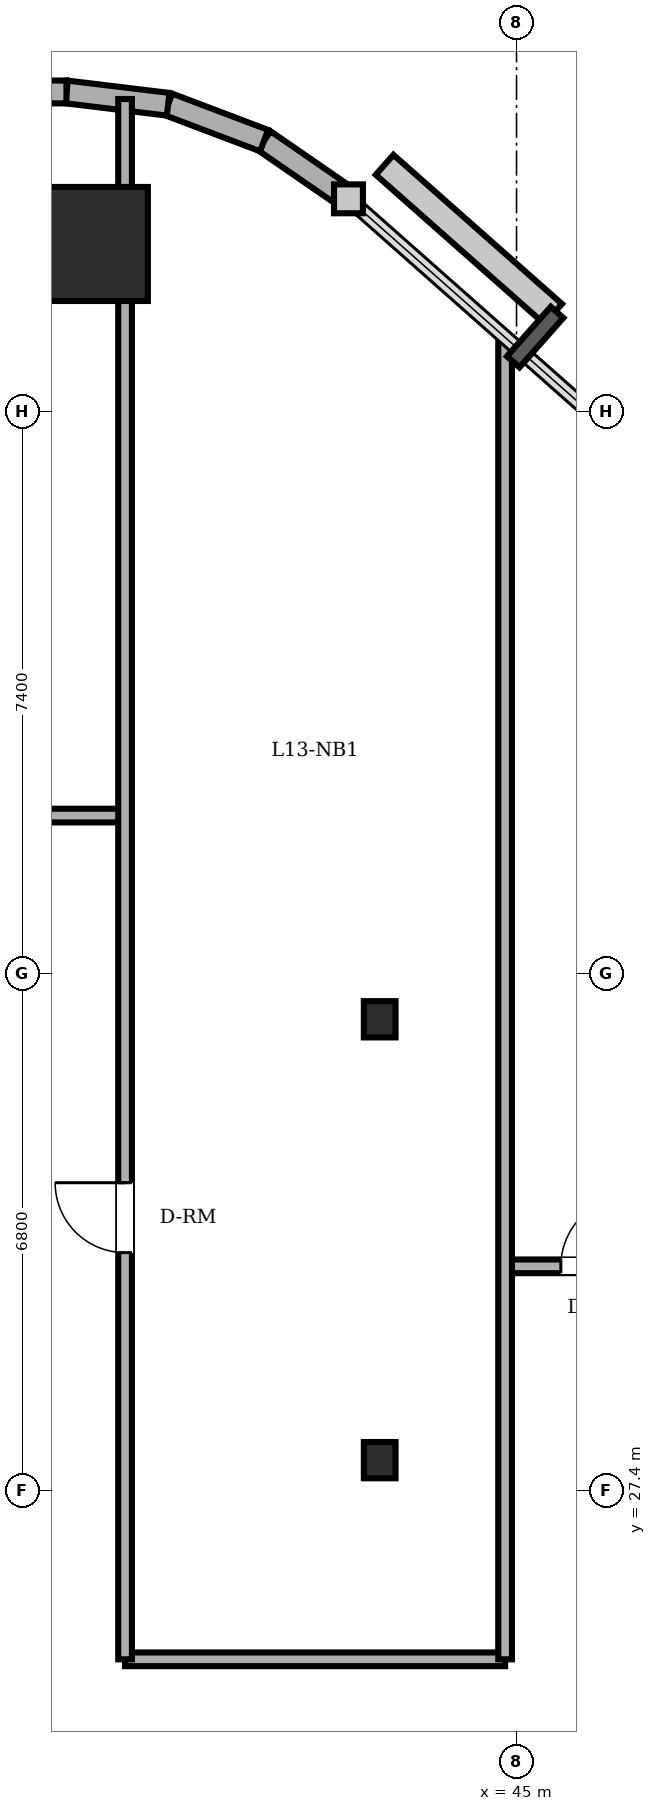
"""IFC4 building model, lengths in metres.
Left out: names, types, materials, properties, quantities, classifications, styles, units other than length and angle.
Written with IfcOpenShell. Run it as: python <this file> out.ifc"""

import sys

from ifc_helpers import new_model, si_unit, direction, frame, frame_2d, origin, origin_2d, place, context, subcontext, project, spatial, rectangle, circle, i_section, extrude, element, fill, save


model = new_model("IFC4")
c1 = context("Model", 3, precision=1e-05, world=origin(), true_north=direction((0.0, 1.0)))
c2 = subcontext(c1, "Body", "Model", "MODEL_VIEW")
j1 = project(units=[si_unit("LENGTHUNIT", "METRE"), si_unit("PLANEANGLEUNIT", "RADIAN")], contexts=[c1])
p1 = place(None, origin())
s1 = spatial("IfcSite", under=j1, at=p1, CompositionType="ELEMENT")
p2 = place(p1, origin())
s2 = spatial("IfcBuilding", under=s1, at=p2, CompositionType="ELEMENT")
p3 = place(p2, frame((0.0, 0.0, 50.4)))
s3 = spatial("IfcBuildingStorey", under=s2, at=p3, CompositionType="ELEMENT", Elevation=50.4)
p4 = place(p3, frame((39.4, 43.8, 0.0), z_axis=(0.0, 0.0, 1.0), x_axis=(1.0, 0.0, 0.0)))
e1 = element("IfcColumn", 1, at=p4, inside=s3, PredefinedType="COLUMN", context=c2, shape_type="SweptSolid", body=[
    extrude(circle(Radius=0.75, at=origin_2d()), origin(), (0.0, 0.0, 1.0), 3.6),
])
for number, where, z_axis, x_axis in (
    (2, (43.2, 27.8, 0.0), (0.0, 0.0, 1.0), (1.0, 0.0, 0.0)),
    (3, (43.2, 33.6, 0.0), (0.0, 0.0, 1.0), (1.0, 0.0, 0.0)),
):
    element("IfcColumn", number, at=place(p3, frame(where, z_axis=z_axis, x_axis=x_axis)), inside=s3, PredefinedType="COLUMN", context=c2, shape_type="SweptSolid", body=[
        extrude(i_section(OverallWidth=0.417, OverallDepth=0.477, WebThickness=0.036, FlangeThickness=0.057, FilletRadius=0.015, at=origin_2d()), origin(), (0.0, 0.0, 1.0), 3.6),
    ])
p5 = place(p3, frame((42.789, 44.394, 0.0), z_axis=(0.0, 0.0, 1.0), x_axis=(-0.823116500192, 0.567872544777, 0.0)))
e4 = element("IfcWall", 4, at=p5, inside=s3, PredefinedType="SOLIDWALL", context=c2, shape_type="SweptSolid", body=[
    extrude(rectangle(XDim=1.349, YDim=0.3, at=frame_2d((0.674, 0.0))), origin(), (0.0, 0.0, 1.0), 3.4),
])
p6 = place(p3, frame((41.679, 45.16, 0.0), z_axis=(0.0, 0.0, 1.0), x_axis=(-0.935156721165, 0.354234254216, 0.0)))
e5 = element("IfcWall", 5, at=p6, inside=s3, PredefinedType="SOLIDWALL", context=c2, shape_type="SweptSolid", body=[
    extrude(rectangle(XDim=1.349, YDim=0.3, at=frame_2d((0.675, 0.0))), origin(), (0.0, 0.0, 1.0), 3.4),
])
p7 = place(p3, frame((40.417, 45.638, 0.0), z_axis=(0.0, 0.0, 1.0), x_axis=(-0.992739027259, 0.120288086515, 0.0)))
e6 = element("IfcWall", 6, at=p7, inside=s3, PredefinedType="SOLIDWALL", context=c2, shape_type="SweptSolid", body=[
    extrude(rectangle(XDim=1.348, YDim=0.3, at=frame_2d((0.674, 0.0))), origin(), (0.0, 0.0, 1.0), 3.4),
])
p8 = place(p3, frame((39.079, 45.8, 0.0), z_axis=(0.0, 0.0, 1.0), x_axis=(-1.0, 0.0, 0.0)))
e7 = element("IfcWall", 7, at=p8, inside=s3, PredefinedType="SOLIDWALL", context=c2, shape_type="SweptSolid", body=[
    extrude(rectangle(XDim=30.079, YDim=0.3, at=frame_2d((15.04, 0.0))), origin(), (0.0, 0.0, 1.0), 3.4),
])
p9 = place(p8, frame((22.404, 0.0, 0.0)))
e8 = element("IfcOpeningElement", 8, at=p9, cuts=e7, PredefinedType="OPENING", context=c2, shape_type="SweptSolid", body=[
    extrude(rectangle(XDim=0.95, YDim=2.2, at=frame_2d((0.475, 1.1))), frame((0.0, 0.16, 0.0), z_axis=(0.0, -1.0, 0.0), x_axis=(1.0, 0.0, 0.0)), (0.0, 0.0, 1.0), 0.32),
])
p10 = place(p8, frame((2.226, 0.0, 0.85)))
e9 = element("IfcOpeningElement", 9, at=p10, cuts=e7, PredefinedType="OPENING", context=c2, shape_type="SweptSolid", body=[
    extrude(rectangle(XDim=1.8, YDim=1.55, at=frame_2d((0.9, 0.775))), frame((0.0, 0.16, 0.0), z_axis=(0.0, -1.0, 0.0), x_axis=(1.0, 0.0, 0.0)), (0.0, 0.0, 1.0), 0.32),
])
p11 = place(p8, frame((5.003, 0.0, 0.85)))
e10 = element("IfcOpeningElement", 10, at=p11, cuts=e7, PredefinedType="OPENING", context=c2, shape_type="SweptSolid", body=[
    extrude(rectangle(XDim=1.8, YDim=1.55, at=frame_2d((0.9, 0.775))), frame((0.0, 0.16, 0.0), z_axis=(0.0, -1.0, 0.0), x_axis=(1.0, 0.0, 0.0)), (0.0, 0.0, 1.0), 0.32),
])
p12 = place(p8, frame((10.179, 0.0, 0.85)))
e11 = element("IfcOpeningElement", 11, at=p12, cuts=e7, PredefinedType="OPENING", context=c2, shape_type="SweptSolid", body=[
    extrude(rectangle(XDim=1.8, YDim=1.55, at=frame_2d((0.9, 0.775))), frame((0.0, 0.16, 0.0), z_axis=(0.0, -1.0, 0.0), x_axis=(1.0, 0.0, 0.0)), (0.0, 0.0, 1.0), 0.32),
])
p13 = place(p8, frame((12.579, 0.0, 0.85)))
e12 = element("IfcOpeningElement", 12, at=p13, cuts=e7, PredefinedType="OPENING", context=c2, shape_type="SweptSolid", body=[
    extrude(rectangle(XDim=1.8, YDim=1.55, at=frame_2d((0.9, 0.775))), frame((0.0, 0.16, 0.0), z_axis=(0.0, -1.0, 0.0), x_axis=(1.0, 0.0, 0.0)), (0.0, 0.0, 1.0), 0.32),
])
p14 = place(p8, frame((19.596, 0.0, 0.85)))
e13 = element("IfcOpeningElement", 13, at=p14, cuts=e7, PredefinedType="OPENING", context=c2, shape_type="SweptSolid", body=[
    extrude(rectangle(XDim=1.8, YDim=1.55, at=frame_2d((0.9, 0.775))), frame((0.0, 0.16, 0.0), z_axis=(0.0, -1.0, 0.0), x_axis=(1.0, 0.0, 0.0)), (0.0, 0.0, 1.0), 0.32),
])
p15 = place(p8, frame((24.212, 0.0, 0.85)))
e14 = element("IfcOpeningElement", 14, at=p15, cuts=e7, PredefinedType="OPENING", context=c2, shape_type="SweptSolid", body=[
    extrude(rectangle(XDim=1.8, YDim=1.55, at=frame_2d((0.9, 0.775))), frame((0.0, 0.16, 0.0), z_axis=(0.0, -1.0, 0.0), x_axis=(1.0, 0.0, 0.0)), (0.0, 0.0, 1.0), 0.32),
])
p16 = place(p3, frame((39.85, 25.18, 0.0), z_axis=(0.0, 0.0, 1.0), x_axis=(1.0, 0.0, 0.0)))
e15 = element("IfcWall", 15, at=p16, inside=s3, PredefinedType="PARTITIONING", context=c2, shape_type="SweptSolid", body=[
    extrude(rectangle(XDim=5.0, YDim=0.18, at=frame_2d((2.5, 0.0))), origin(), (0.0, 0.0, 1.0), 3.4),
])
p17 = place(p3, frame((44.85, 30.35, 0.0), z_axis=(0.0, 0.0, 1.0), x_axis=(1.0, 0.0, 0.0)))
e16 = element("IfcWall", 16, at=p17, inside=s3, PredefinedType="PARTITIONING", context=c2, shape_type="SweptSolid", body=[
    extrude(rectangle(XDim=6.75, YDim=0.18, at=frame_2d((3.375, 0.0))), origin(), (0.0, 0.0, 1.0), 3.4),
])
p18 = place(p17, frame((0.733, 0.0, 0.0)))
e17 = element("IfcOpeningElement", 17, at=p18, cuts=e16, PredefinedType="OPENING", context=c2, shape_type="SweptSolid", body=[
    extrude(rectangle(XDim=0.92, YDim=2.1, at=frame_2d((0.46, 1.05))), frame((0.0, 0.1, 0.0), z_axis=(0.0, -1.0, 0.0), x_axis=(1.0, 0.0, 0.0)), (0.0, 0.0, 1.0), 0.2),
])
p19 = place(p3, frame((3.4, 36.28, 0.0), z_axis=(0.0, 0.0, 1.0), x_axis=(1.0, 0.0, 0.0)))
e18 = element("IfcWall", 18, at=p19, inside=s3, PredefinedType="PARTITIONING", context=c2, shape_type="SweptSolid", body=[
    extrude(rectangle(XDim=36.45, YDim=0.18, at=frame_2d((18.225, 0.0))), origin(), (0.0, 0.0, 1.0), 3.4),
])
p20 = place(p19, frame((21.05, 0.0, 0.0)))
e19 = element("IfcOpeningElement", 19, at=p20, cuts=e18, PredefinedType="OPENING", context=c2, shape_type="SweptSolid", body=[
    extrude(rectangle(XDim=0.9, YDim=2.1, at=frame_2d((0.45, 1.05))), frame((0.0, 0.1, 0.0), z_axis=(0.0, -1.0, 0.0), x_axis=(1.0, 0.0, 0.0)), (0.0, 0.0, 1.0), 0.2),
])
p21 = place(p19, frame((24.67, 0.0, 0.0)))
e20 = element("IfcOpeningElement", 20, at=p21, cuts=e18, PredefinedType="OPENING", context=c2, shape_type="SweptSolid", body=[
    extrude(rectangle(XDim=0.86, YDim=2.1, at=frame_2d((0.43, 1.05))), frame((0.0, 0.1, 0.0), z_axis=(0.0, -1.0, 0.0), x_axis=(1.0, 0.0, 0.0)), (0.0, 0.0, 1.0), 0.2),
])
p22 = place(p19, frame((10.7, 0.0, 0.0)))
e21 = element("IfcOpeningElement", 21, at=p22, cuts=e18, PredefinedType="OPENING", context=c2, shape_type="SweptSolid", body=[
    extrude(rectangle(XDim=1.0, YDim=2.15, at=frame_2d((0.5, 1.075))), frame((0.0, 0.1, 0.0), z_axis=(0.0, -1.0, 0.0), x_axis=(1.0, 0.0, 0.0)), (0.0, 0.0, 1.0), 0.2),
])
p23 = place(p19, frame((30.965, 0.0, 0.0)))
e22 = element("IfcOpeningElement", 22, at=p23, cuts=e18, PredefinedType="OPENING", context=c2, shape_type="SweptSolid", body=[
    extrude(rectangle(XDim=1.0, YDim=2.15, at=frame_2d((0.5, 1.075))), frame((0.0, 0.1, 0.0), z_axis=(0.0, -1.0, 0.0), x_axis=(1.0, 0.0, 0.0)), (0.0, 0.0, 1.0), 0.2),
])
p24 = place(p3, frame((39.85, 25.18, 0.0), z_axis=(0.0, 0.0, 1.0), x_axis=(0.0, 1.0, 0.0)))
e23 = element("IfcWall", 23, at=p24, inside=s3, PredefinedType="PARTITIONING", context=c2, shape_type="SweptSolid", body=[
    extrude(rectangle(XDim=20.527, YDim=0.18, at=frame_2d((10.264, 0.0))), origin(), (0.0, 0.0, 1.0), 2.782),
])
p25 = place(p24, frame((5.35, 0.0, 0.0)))
e24 = element("IfcOpeningElement", 24, at=p25, cuts=e23, PredefinedType="OPENING", context=c2, shape_type="SweptSolid", body=[
    extrude(rectangle(XDim=0.92, YDim=2.1, at=frame_2d((0.46, 1.05))), frame((0.0, 0.1, 0.0), z_axis=(0.0, -1.0, 0.0), x_axis=(1.0, 0.0, 0.0)), (0.0, 0.0, 1.0), 0.2),
])
p26 = place(p3, frame((44.85, 25.18, 0.0), z_axis=(0.0, 0.0, 1.0), x_axis=(0.0, 1.0, 0.0)))
e25 = element("IfcWall", 25, at=p26, inside=s3, PredefinedType="PARTITIONING", context=c2, shape_type="SweptSolid", body=[
    extrude(rectangle(XDim=17.391, YDim=0.18, at=frame_2d((8.696, 0.0))), origin(), (0.0, 0.0, 1.0), 3.4),
])
p27 = place(p25, origin())
e26 = element("IfcDoor", 26, at=p27, inside=s3, OperationType="SINGLE_SWING_RIGHT", PredefinedType="DOOR", context=c2, shape_type="SweptSolid", body=[
    extrude(rectangle(XDim=0.92, YDim=2.1, at=frame_2d((0.46, 1.05))), frame((0.0, 0.025, 0.0), z_axis=(0.0, -1.0, 0.0), x_axis=(1.0, 0.0, 0.0)), (0.0, 0.0, 1.0), 0.05),
])
fill(e24, e26)
p28 = place(p18, origin())
e27 = element("IfcDoor", 27, at=p28, inside=s3, OperationType="SINGLE_SWING_RIGHT", PredefinedType="DOOR", context=c2, shape_type="SweptSolid", body=[
    extrude(rectangle(XDim=0.92, YDim=2.1, at=frame_2d((0.46, 1.05))), frame((0.0, 0.025, 0.0), z_axis=(0.0, -1.0, 0.0), x_axis=(1.0, 0.0, 0.0)), (0.0, 0.0, 1.0), 0.05),
])
fill(e17, e27)
save(model, sys.argv[1])
